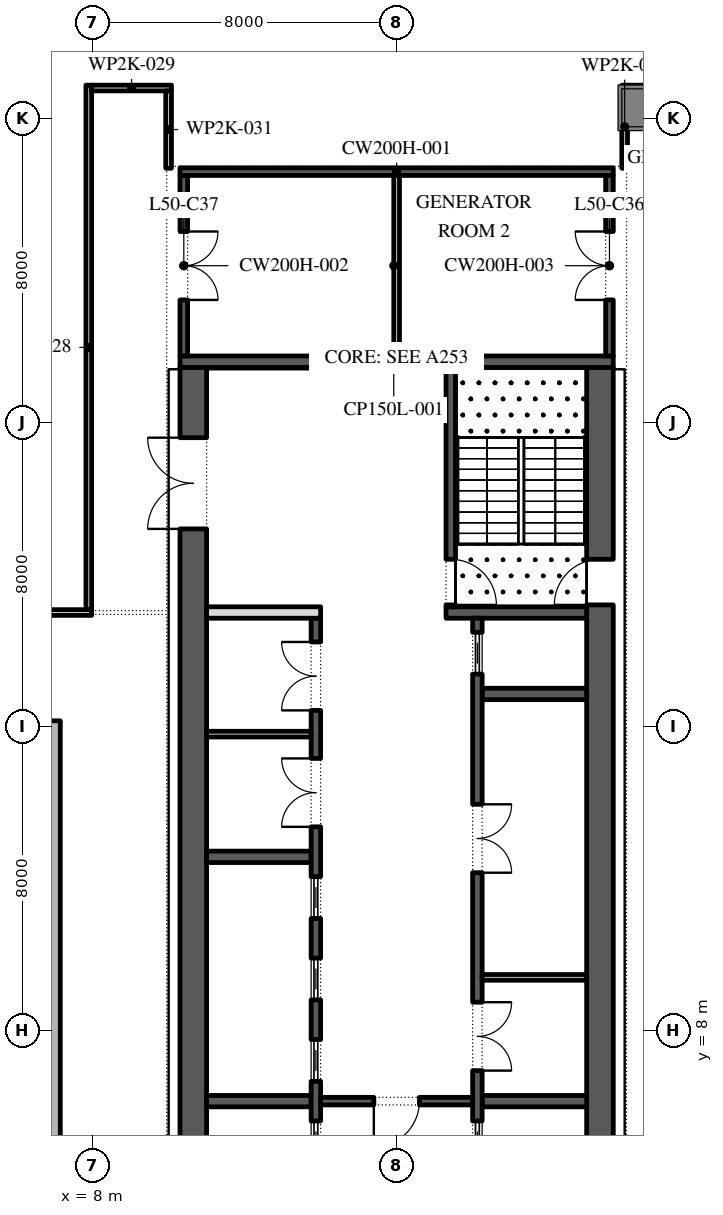
"""IFC4 building model, lengths in metres.
Left out: names, types, materials, properties, quantities, classifications, styles, units other than length and angle.
Written with IfcOpenShell. Run it as: python <this file> out.ifc"""

import sys

from ifc_helpers import new_model, si_unit, direction, frame, frame_2d, origin, place, context, subcontext, project, spatial, polyline, rectangle, outline, extrude, element, fill, save


model = new_model("IFC4")
c1 = context("Model", 3, precision=1e-05, world=origin(), true_north=direction((0.0, 1.0)))
c2 = subcontext(c1, "Body", "Model", "MODEL_VIEW")
j1 = project(units=[si_unit("LENGTHUNIT", "METRE"), si_unit("PLANEANGLEUNIT", "RADIAN")], contexts=[c1])
p1 = place(None, origin())
s1 = spatial("IfcSite", under=j1, at=p1, CompositionType="ELEMENT")
p2 = place(p1, origin())
s2 = spatial("IfcBuilding", under=s1, at=p2, CompositionType="ELEMENT")
p3 = place(p2, frame((0.0, 0.0, 226.2)))
s3 = spatial("IfcBuildingStorey", under=s2, at=p3, CompositionType="ELEMENT", Elevation=226.2)
p4 = place(p3, origin())
e1 = element("IfcWall", 1, at=p4, inside=s3, PredefinedType="STANDARD", context=c2, shape_type="SweptSolid", body=[
    extrude(outline(polyline([(-7.15, -2.15), (7.15, -2.15), (7.15, 16.15), (-7.15, 16.15), (-7.15, -2.15)]), holes=[polyline([(-7.0, -2.0), (-7.0, 16.0), (7.0, 16.0), (7.0, -2.0), (-7.0, -2.0)])]), origin(), (0.0, 0.0, 1.0), 10.35),
])
p5 = place(p3, frame((35.363, -6.512, -0.05), z_axis=(0.0, 0.0, 1.0), x_axis=(-0.224952557287, 0.974369717802, 0.0)))
e2 = element("IfcWall", 2, at=p5, inside=s3, PredefinedType="STANDARD", context=c2, shape_type="SweptSolid", body=[
    extrude(rectangle(XDim=58.252, YDim=0.2, at=frame_2d((29.126, 0.0))), origin(), (0.0, 0.0, 1.0), 1.1),
])
p6 = place(p3, frame((21.35, -2.45, 0.0), z_axis=(0.0, 0.0, 1.0), x_axis=(0.0, 1.0, 0.0)))
e3 = element("IfcWall", 3, at=p6, inside=s3, PredefinedType="SHEAR", context=c2, shape_type="SweptSolid", body=[
    extrude(rectangle(XDim=27.9, YDim=0.7, at=frame_2d((13.95, 0.0))), origin(), (0.0, 0.0, 1.0), 10.35),
])
p7 = place(p6, frame((5.05, 0.0, 0.0)))
e4 = element("IfcOpeningElement", 4, at=p7, cuts=e3, PredefinedType="OPENING", context=c2, shape_type="SweptSolid", body=[
    extrude(rectangle(XDim=1.2, YDim=2.1, at=frame_2d((0.6, 1.05))), frame((0.0, 0.36, 0.0), z_axis=(0.0, -1.0, 0.0), x_axis=(1.0, 0.0, 0.0)), (0.0, 0.0, 1.0), 0.72),
])
p8 = place(p6, frame((21.65, 0.0, 0.0)))
e5 = element("IfcOpeningElement", 5, at=p8, cuts=e3, PredefinedType="OPENING", context=c2, shape_type="SweptSolid", body=[
    extrude(rectangle(XDim=1.2, YDim=2.1, at=frame_2d((0.6, 1.05))), frame((0.0, 0.36, 0.0), z_axis=(0.0, -1.0, 0.0), x_axis=(1.0, 0.0, 0.0)), (0.0, 0.0, 1.0), 0.72),
])
p9 = place(p3, frame((10.65, -2.45, 0.0), z_axis=(0.0, 0.0, 1.0), x_axis=(0.0, 1.0, 0.0)))
e6 = element("IfcWall", 6, at=p9, inside=s3, PredefinedType="SHEAR", context=c2, shape_type="SweptSolid", body=[
    extrude(rectangle(XDim=27.9, YDim=0.7, at=frame_2d((13.95, 0.0))), origin(), (0.0, 0.0, 1.0), 10.35),
])
p10 = place(p9, frame((23.65, 0.0, 0.0)))
e7 = element("IfcOpeningElement", 7, at=p10, cuts=e6, PredefinedType="OPENING", context=c2, shape_type="SweptSolid", body=[
    extrude(rectangle(XDim=2.4, YDim=2.1, at=frame_2d((1.2, 1.05))), frame((0.0, 0.36, 0.0), z_axis=(0.0, -1.0, 0.0), x_axis=(1.0, 0.0, 0.0)), (0.0, 0.0, 1.0), 0.72),
])
p11 = place(p9, frame((0.637, 0.0, 0.0)))
e8 = element("IfcOpeningElement", 8, at=p11, cuts=e6, PredefinedType="OPENING", context=c2, shape_type="SweptSolid", body=[
    extrude(rectangle(XDim=1.8, YDim=2.4, at=frame_2d((0.9, 1.2))), frame((0.0, 0.36, 0.0), z_axis=(0.0, -1.0, 0.0), x_axis=(1.0, 0.0, 0.0)), (0.0, 0.0, 1.0), 0.72),
])
p12 = place(p9, frame((3.863, 0.0, 0.0)))
e9 = element("IfcOpeningElement", 9, at=p12, cuts=e6, PredefinedType="OPENING", context=c2, shape_type="SweptSolid", body=[
    extrude(rectangle(XDim=1.8, YDim=2.4, at=frame_2d((0.9, 1.2))), frame((0.0, 0.36, 0.0), z_axis=(0.0, -1.0, 0.0), x_axis=(1.0, 0.0, 0.0)), (0.0, 0.0, 1.0), 0.72),
])
p13 = place(p3, frame((10.3, 25.6, 0.0), z_axis=(0.0, 0.0, 1.0), x_axis=(1.0, 0.0, 0.0)))
e10 = element("IfcWall", 10, at=p13, inside=s3, PredefinedType="SHEAR", context=c2, shape_type="SweptSolid", body=[
    extrude(rectangle(XDim=11.4, YDim=0.3, at=frame_2d((5.7, 0.0))), origin(), (0.0, 0.0, 1.0), 10.35),
])
p14 = place(p3, frame((17.3, 19.0, 0.0), z_axis=(0.0, 0.0, 1.0), x_axis=(1.0, 0.0, 0.0)))
e11 = element("IfcWall", 11, at=p14, inside=s3, PredefinedType="SHEAR", context=c2, shape_type="SweptSolid", body=[
    extrude(rectangle(XDim=3.7, YDim=0.3, at=frame_2d((1.85, 0.0))), origin(), (0.0, 0.0, 1.0), 10.35),
])
p15 = place(p3, frame((17.425, 19.15, 0.0), z_axis=(0.0, 0.0, 1.0), x_axis=(0.0, 1.0, 0.0)))
e12 = element("IfcWall", 12, at=p15, inside=s3, PredefinedType="SHEAR", context=c2, shape_type="SweptSolid", body=[
    extrude(rectangle(XDim=6.3, YDim=0.25, at=frame_2d((3.15, 0.0))), origin(), (0.0, 0.0, 1.0), 10.35),
])
p16 = place(p15, frame((0.05, 0.0, 0.0)))
e13 = element("IfcOpeningElement", 13, at=p16, cuts=e12, PredefinedType="OPENING", context=c2, shape_type="SweptSolid", body=[
    extrude(rectangle(XDim=1.2, YDim=2.1, at=frame_2d((0.6, 1.05))), frame((0.0, 0.135, 0.0), z_axis=(0.0, -1.0, 0.0), x_axis=(1.0, 0.0, 0.0)), (0.0, 0.0, 1.0), 0.27),
])
for number, where, z_axis, x_axis in (
    (14, (18.25, 6.143, 0.0), (0.0, 0.0, 1.0), (1.0, 0.0, 0.0)),
    (15, (18.25, 16.857, 0.0), (0.0, 0.0, 1.0), (1.0, 0.0, 0.0)),
):
    element("IfcWall", number, at=place(p3, frame(where, z_axis=z_axis, x_axis=x_axis)), inside=s3, PredefinedType="SHEAR", context=c2, shape_type="SweptSolid", body=[
        extrude(rectangle(XDim=2.75, YDim=0.3, at=frame_2d((1.375, 0.0))), origin(), (0.0, 0.0, 1.0), 10.35),
    ])
p17 = place(p3, frame((18.125, 4.15, 0.0), z_axis=(0.0, 0.0, 1.0), x_axis=(0.0, 1.0, 0.0)))
e16 = element("IfcWall", 16, at=p17, inside=s3, PredefinedType="SHEAR", context=c2, shape_type="SweptSolid", body=[
    extrude(rectangle(XDim=14.7, YDim=0.25, at=frame_2d((7.35, 0.0))), origin(), (0.0, 0.0, 1.0), 10.35),
])
p18 = place(p17, frame((2.796, 0.0, 0.0)))
e17 = element("IfcOpeningElement", 17, at=p18, cuts=e16, PredefinedType="OPENING", context=c2, shape_type="SweptSolid", body=[
    extrude(rectangle(XDim=1.8, YDim=2.4, at=frame_2d((0.9, 1.2))), frame((0.0, 0.135, 0.0), z_axis=(0.0, -1.0, 0.0), x_axis=(1.0, 0.0, 0.0)), (0.0, 0.0, 1.0), 0.27),
])
p19 = place(p17, frame((8.004, 0.0, 0.0)))
e18 = element("IfcOpeningElement", 18, at=p19, cuts=e16, PredefinedType="OPENING", context=c2, shape_type="SweptSolid", body=[
    extrude(rectangle(XDim=1.8, YDim=2.4, at=frame_2d((0.9, 1.2))), frame((0.0, 0.135, 0.0), z_axis=(0.0, -1.0, 0.0), x_axis=(1.0, 0.0, 0.0)), (0.0, 0.0, 1.0), 0.27),
])
p20 = place(p17, frame((0.371, 0.0, 0.0)))
e19 = element("IfcOpeningElement", 19, at=p20, cuts=e16, PredefinedType="OPENING", context=c2, shape_type="SweptSolid", body=[
    extrude(rectangle(XDim=1.1, YDim=2.1, at=frame_2d((0.55, 1.05))), frame((0.0, 0.135, 0.0), z_axis=(0.0, -1.0, 0.0), x_axis=(1.0, 0.0, 0.0)), (0.0, 0.0, 1.0), 0.27),
])
p21 = place(p17, frame((13.229, 0.0, 0.0)))
e20 = element("IfcOpeningElement", 20, at=p21, cuts=e16, PredefinedType="OPENING", context=c2, shape_type="SweptSolid", body=[
    extrude(rectangle(XDim=1.1, YDim=2.1, at=frame_2d((0.55, 1.05))), frame((0.0, 0.135, 0.0), z_axis=(0.0, -1.0, 0.0), x_axis=(1.0, 0.0, 0.0)), (0.0, 0.0, 1.0), 0.27),
])
p22 = place(p3, frame((18.25, 9.4, 0.0), z_axis=(0.0, 0.0, 1.0), x_axis=(1.0, 0.0, 0.0)))
e21 = element("IfcWall", 21, at=p22, inside=s3, PredefinedType="PARTITIONING", context=c2, shape_type="SweptSolid", body=[
    extrude(rectangle(XDim=2.75, YDim=0.15, at=frame_2d((1.375, 0.0))), origin(), (0.0, 0.0, 1.0), 10.35),
])
for number, where, z_axis, x_axis in (
    (22, (11.0, 6.143, 0.0), (0.0, 0.0, 1.0), (1.0, 0.0, 0.0)),
    (23, (11.0, 12.571, 0.0), (0.0, 0.0, 1.0), (1.0, 0.0, 0.0)),
):
    element("IfcWall", number, at=place(p3, frame(where, z_axis=z_axis, x_axis=x_axis)), inside=s3, PredefinedType="SHEAR", context=c2, shape_type="SweptSolid", body=[
        extrude(rectangle(XDim=2.75, YDim=0.3, at=frame_2d((1.375, 0.0))), origin(), (0.0, 0.0, 1.0), 10.35),
    ])
p23 = place(p3, frame((13.875, -2.45, 0.0), z_axis=(0.0, 0.0, 1.0), x_axis=(0.0, 1.0, 0.0)))
e24 = element("IfcWall", 24, at=p23, inside=s3, PredefinedType="SHEAR", context=c2, shape_type="SweptSolid", body=[
    extrude(rectangle(XDim=21.3, YDim=0.25, at=frame_2d((10.65, 0.0))), origin(), (0.0, 0.0, 1.0), 10.35),
])
p24 = place(p23, frame((15.811, 0.0, 0.0)))
e25 = element("IfcOpeningElement", 25, at=p24, cuts=e24, PredefinedType="OPENING", context=c2, shape_type="SweptSolid", body=[
    extrude(rectangle(XDim=1.8, YDim=2.4, at=frame_2d((0.9, 1.2))), frame((0.0, 0.135, 0.0), z_axis=(0.0, -1.0, 0.0), x_axis=(1.0, 0.0, 0.0)), (0.0, 0.0, 1.0), 0.27),
])
p25 = place(p23, frame((18.875, 0.0, 0.0)))
e26 = element("IfcOpeningElement", 26, at=p25, cuts=e24, PredefinedType="OPENING", context=c2, shape_type="SweptSolid", body=[
    extrude(rectangle(XDim=1.8, YDim=2.4, at=frame_2d((0.9, 1.2))), frame((0.0, 0.135, 0.0), z_axis=(0.0, -1.0, 0.0), x_axis=(1.0, 0.0, 0.0)), (0.0, 0.0, 1.0), 0.27),
])
p26 = place(p23, frame((6.971, 0.0, 0.0)))
e27 = element("IfcOpeningElement", 27, at=p26, cuts=e24, PredefinedType="OPENING", context=c2, shape_type="SweptSolid", body=[
    extrude(rectangle(XDim=1.1, YDim=2.1, at=frame_2d((0.55, 1.05))), frame((0.0, 0.135, 0.0), z_axis=(0.0, -1.0, 0.0), x_axis=(1.0, 0.0, 0.0)), (0.0, 0.0, 1.0), 0.27),
])
p27 = place(p23, frame((9.114, 0.0, 0.0)))
e28 = element("IfcOpeningElement", 28, at=p27, cuts=e24, PredefinedType="OPENING", context=c2, shape_type="SweptSolid", body=[
    extrude(rectangle(XDim=1.1, YDim=2.1, at=frame_2d((0.55, 1.05))), frame((0.0, 0.135, 0.0), z_axis=(0.0, -1.0, 0.0), x_axis=(1.0, 0.0, 0.0)), (0.0, 0.0, 1.0), 0.27),
])
p28 = place(p23, frame((11.257, 0.0, 0.0)))
e29 = element("IfcOpeningElement", 29, at=p28, cuts=e24, PredefinedType="OPENING", context=c2, shape_type="SweptSolid", body=[
    extrude(rectangle(XDim=1.1, YDim=2.1, at=frame_2d((0.55, 1.05))), frame((0.0, 0.135, 0.0), z_axis=(0.0, -1.0, 0.0), x_axis=(1.0, 0.0, 0.0)), (0.0, 0.0, 1.0), 0.27),
])
p29 = place(p23, frame((13.4, 0.0, 0.0)))
e30 = element("IfcOpeningElement", 30, at=p29, cuts=e24, PredefinedType="OPENING", context=c2, shape_type="SweptSolid", body=[
    extrude(rectangle(XDim=1.1, YDim=2.1, at=frame_2d((0.55, 1.05))), frame((0.0, 0.135, 0.0), z_axis=(0.0, -1.0, 0.0), x_axis=(1.0, 0.0, 0.0)), (0.0, 0.0, 1.0), 0.27),
])
p30 = place(p3, frame((11.0, 19.0, 0.0), z_axis=(0.0, 0.0, 1.0), x_axis=(1.0, 0.0, 0.0)))
e31 = element("IfcWall", 31, at=p30, inside=s3, PredefinedType="PARTITIONING", context=c2, shape_type="SweptSolid", body=[
    extrude(rectangle(XDim=3.0, YDim=0.3, at=frame_2d((1.5, 0.0))), origin(), (0.0, 0.0, 1.0), 10.35),
])
p31 = place(p3, frame((11.0, 15.8, 0.0), z_axis=(0.0, 0.0, 1.0), x_axis=(1.0, 0.0, 0.0)))
e32 = element("IfcWall", 32, at=p31, inside=s3, PredefinedType="PARTITIONING", context=c2, shape_type="SweptSolid", body=[
    extrude(rectangle(XDim=2.75, YDim=0.15, at=frame_2d((1.375, 0.0))), origin(), (0.0, 0.0, 1.0), 10.35),
])
p32 = place(p3, frame((14.0, 6.143, 0.0), z_axis=(0.0, 0.0, 1.0), x_axis=(1.0, 0.0, 0.0)))
e33 = element("IfcWall", 33, at=p32, inside=s3, PredefinedType="SHEAR", context=c2, shape_type="SweptSolid", body=[
    extrude(rectangle(XDim=4.0, YDim=0.2, at=frame_2d((2.0, 0.0))), origin(), (0.0, 0.0, 1.0), 10.35),
])
p33 = place(p32, frame((1.4, 0.0, 0.0)))
e34 = element("IfcOpeningElement", 34, at=p33, cuts=e33, PredefinedType="OPENING", context=c2, shape_type="SweptSolid", body=[
    extrude(rectangle(XDim=1.2, YDim=2.1, at=frame_2d((0.6, 1.05))), frame((0.0, 0.11, 0.0), z_axis=(0.0, -1.0, 0.0), x_axis=(1.0, 0.0, 0.0)), (0.0, 0.0, 1.0), 0.22),
])
p34 = place(p3, frame((21.6, 25.75, 0.0), z_axis=(0.0, 0.0, 1.0), x_axis=(0.0, 1.0, 0.0)))
e35 = element("IfcWall", 35, at=p34, inside=s3, PredefinedType="SHEAR", context=c2, shape_type="SweptSolid", body=[
    extrude(rectangle(XDim=4.75, YDim=0.2, at=frame_2d((2.375, 0.0))), origin(), (0.0, 0.0, 1.0), 10.35),
])
p35 = place(p34, frame((1.475, 0.0, 0.0)))
e36 = element("IfcOpeningElement", 36, at=p35, cuts=e35, PredefinedType="OPENING", context=c2, shape_type="SweptSolid", body=[
    extrude(rectangle(XDim=1.8, YDim=2.4, at=frame_2d((0.9, 1.2))), frame((0.0, 0.11, 0.0), z_axis=(0.0, -1.0, 0.0), x_axis=(1.0, 0.0, 0.0)), (0.0, 0.0, 1.0), 0.22),
])
p36 = place(p3, frame((10.4, 25.75, 0.0), z_axis=(0.0, 0.0, 1.0), x_axis=(0.0, 1.0, 0.0)))
e37 = element("IfcWall", 37, at=p36, inside=s3, PredefinedType="SHEAR", context=c2, shape_type="SweptSolid", body=[
    extrude(rectangle(XDim=4.75, YDim=0.2, at=frame_2d((2.375, 0.0))), origin(), (0.0, 0.0, 1.0), 10.35),
])
p37 = place(p36, frame((1.475, 0.0, 0.0)))
e38 = element("IfcOpeningElement", 38, at=p37, cuts=e37, PredefinedType="OPENING", context=c2, shape_type="SweptSolid", body=[
    extrude(rectangle(XDim=1.8, YDim=2.4, at=frame_2d((0.9, 1.2))), frame((0.0, 0.11, 0.0), z_axis=(0.0, -1.0, 0.0), x_axis=(1.0, 0.0, 0.0)), (0.0, 0.0, 1.0), 0.22),
])
p38 = place(p3, frame((10.3, 30.6, 0.0), z_axis=(0.0, 0.0, 1.0), x_axis=(1.0, 0.0, 0.0)))
e39 = element("IfcWall", 39, at=p38, inside=s3, PredefinedType="SHEAR", context=c2, shape_type="SweptSolid", body=[
    extrude(rectangle(XDim=11.4, YDim=0.2, at=frame_2d((5.7, 0.0))), origin(), (0.0, 0.0, 1.0), 10.35),
])
p39 = place(p3, frame((16.0, 25.75, 0.0), z_axis=(0.0, 0.0, 1.0), x_axis=(0.0, 1.0, 0.0)))
e40 = element("IfcWall", 40, at=p39, inside=s3, PredefinedType="PARTITIONING", context=c2, shape_type="SweptSolid", body=[
    extrude(rectangle(XDim=4.75, YDim=0.15, at=frame_2d((2.375, 0.0))), origin(), (0.0, 0.0, 1.0), 10.35),
])
p40 = place(p3, frame((1.085, 19.0, 0.0), z_axis=(0.0, 0.0, 1.0), x_axis=(1.0, 0.0, 0.0)))
e41 = element("IfcWall", 41, at=p40, inside=s3, PredefinedType="PARTITIONING", context=c2, shape_type="SweptSolid", body=[
    extrude(rectangle(XDim=6.89, YDim=0.15, at=frame_2d((3.445, 0.0))), origin(), (0.0, 0.0, 1.0), 10.35),
])
p41 = place(p3, frame((7.9, 19.075, 0.0), z_axis=(0.0, 0.0, 1.0), x_axis=(0.0, 1.0, 0.0)))
e42 = element("IfcWall", 42, at=p41, inside=s3, PredefinedType="PARTITIONING", context=c2, shape_type="SweptSolid", body=[
    extrude(rectangle(XDim=13.8, YDim=0.15, at=frame_2d((6.9, 0.0))), origin(), (0.0, 0.0, 1.0), 10.35),
])
p42 = place(p3, frame((7.975, 32.8, 0.0), z_axis=(0.0, 0.0, 1.0), x_axis=(1.0, 0.0, 0.0)))
e43 = element("IfcWall", 43, at=p42, inside=s3, PredefinedType="PARTITIONING", context=c2, shape_type="SweptSolid", body=[
    extrude(rectangle(XDim=2.1, YDim=0.15, at=frame_2d((1.05, 0.0))), origin(), (0.0, 0.0, 1.0), 10.35),
])
p43 = place(p3, frame((10.0, 32.725, 0.0), z_axis=(0.0, 0.0, 1.0), x_axis=(0.0, -1.0, 0.0)))
e44 = element("IfcWall", 44, at=p43, inside=s3, PredefinedType="PARTITIONING", context=c2, shape_type="SweptSolid", body=[
    extrude(rectangle(XDim=2.035, YDim=0.15, at=frame_2d((1.018, 0.0))), origin(), (0.0, 0.0, 1.0), 10.35),
])
p44 = place(p3, frame((22.0, 30.69, 0.0), z_axis=(0.0, 0.0, 1.0), x_axis=(0.0, 1.0, 0.0)))
e45 = element("IfcWall", 45, at=p44, inside=s3, PredefinedType="PARTITIONING", context=c2, shape_type="SweptSolid", body=[
    extrude(rectangle(XDim=2.185, YDim=0.15, at=frame_2d((1.093, 0.0))), origin(), (0.0, 0.0, 1.0), 10.35),
])
p45 = place(p3, frame((22.075, 32.8, 0.0), z_axis=(0.0, 0.0, 1.0), x_axis=(1.0, 0.0, 0.0)))
e46 = element("IfcWall", 46, at=p45, inside=s3, PredefinedType="PARTITIONING", context=c2, shape_type="SweptSolid", body=[
    extrude(rectangle(XDim=2.025, YDim=0.15, at=frame_2d((1.013, 0.0))), origin(), (0.0, 0.0, 1.0), 10.35),
])
p46 = place(p18, frame((1.8, -0.2, 0.0), z_axis=(0.0, 0.0, 1.0), x_axis=(-1.0, 0.0, 0.0)))
e47 = element("IfcDoor", 47, at=p46, inside=s3, OperationType="DOUBLE_DOOR_SINGLE_SWING", PredefinedType="DOOR", context=c2, shape_type="SweptSolid", body=[
    extrude(rectangle(XDim=1.8, YDim=2.4, at=frame_2d((0.9, 1.2))), frame((0.0, -0.075, 0.0), z_axis=(0.0, -1.0, 0.0), x_axis=(1.0, 0.0, 0.0)), (0.0, 0.0, 1.0), 0.05),
])
fill(e17, e47)
p47 = place(p19, frame((1.8, -0.2, 0.0), z_axis=(0.0, 0.0, 1.0), x_axis=(-1.0, 0.0, 0.0)))
e48 = element("IfcDoor", 48, at=p47, inside=s3, OperationType="DOUBLE_DOOR_SINGLE_SWING", PredefinedType="DOOR", context=c2, shape_type="SweptSolid", body=[
    extrude(rectangle(XDim=1.8, YDim=2.4, at=frame_2d((0.9, 1.2))), frame((0.0, -0.075, 0.0), z_axis=(0.0, -1.0, 0.0), x_axis=(1.0, 0.0, 0.0)), (0.0, 0.0, 1.0), 0.05),
])
fill(e18, e48)
p48 = place(p20, origin())
e49 = element("IfcDoor", 49, at=p48, inside=s3, OperationType="SLIDING_TO_LEFT", PredefinedType="DOOR", context=c2, shape_type="SweptSolid", body=[
    extrude(rectangle(XDim=1.1, YDim=2.1, at=frame_2d((0.55, 1.05))), frame((0.0, 0.025, 0.0), z_axis=(0.0, -1.0, 0.0), x_axis=(1.0, 0.0, 0.0)), (0.0, 0.0, 1.0), 0.05),
])
fill(e19, e49)
p49 = place(p21, origin())
e50 = element("IfcDoor", 50, at=p49, inside=s3, OperationType="SLIDING_TO_LEFT", PredefinedType="DOOR", context=c2, shape_type="SweptSolid", body=[
    extrude(rectangle(XDim=1.1, YDim=2.1, at=frame_2d((0.55, 1.05))), frame((0.0, 0.025, 0.0), z_axis=(0.0, -1.0, 0.0), x_axis=(1.0, 0.0, 0.0)), (0.0, 0.0, 1.0), 0.05),
])
fill(e20, e50)
p50 = place(p24, origin())
e51 = element("IfcDoor", 51, at=p50, inside=s3, OperationType="DOUBLE_DOOR_SINGLE_SWING", PredefinedType="DOOR", context=c2, shape_type="SweptSolid", body=[
    extrude(rectangle(XDim=1.8, YDim=2.4, at=frame_2d((0.9, 1.2))), frame((0.0, 0.125, 0.0), z_axis=(0.0, -1.0, 0.0), x_axis=(1.0, 0.0, 0.0)), (0.0, 0.0, 1.0), 0.05),
])
fill(e25, e51)
p51 = place(p25, origin())
e52 = element("IfcDoor", 52, at=p51, inside=s3, OperationType="DOUBLE_DOOR_SINGLE_SWING", PredefinedType="DOOR", context=c2, shape_type="SweptSolid", body=[
    extrude(rectangle(XDim=1.8, YDim=2.4, at=frame_2d((0.9, 1.2))), frame((0.0, 0.125, 0.0), z_axis=(0.0, -1.0, 0.0), x_axis=(1.0, 0.0, 0.0)), (0.0, 0.0, 1.0), 0.05),
])
fill(e26, e52)
p52 = place(p26, origin())
e53 = element("IfcDoor", 53, at=p52, inside=s3, OperationType="SLIDING_TO_LEFT", PredefinedType="DOOR", context=c2, shape_type="SweptSolid", body=[
    extrude(rectangle(XDim=1.1, YDim=2.1, at=frame_2d((0.55, 1.05))), frame((0.0, 0.025, 0.0), z_axis=(0.0, -1.0, 0.0), x_axis=(1.0, 0.0, 0.0)), (0.0, 0.0, 1.0), 0.05),
])
fill(e27, e53)
p53 = place(p27, origin())
e54 = element("IfcDoor", 54, at=p53, inside=s3, OperationType="SLIDING_TO_LEFT", PredefinedType="DOOR", context=c2, shape_type="SweptSolid", body=[
    extrude(rectangle(XDim=1.1, YDim=2.1, at=frame_2d((0.55, 1.05))), frame((0.0, 0.025, 0.0), z_axis=(0.0, -1.0, 0.0), x_axis=(1.0, 0.0, 0.0)), (0.0, 0.0, 1.0), 0.05),
])
fill(e28, e54)
p54 = place(p28, origin())
e55 = element("IfcDoor", 55, at=p54, inside=s3, OperationType="SLIDING_TO_LEFT", PredefinedType="DOOR", context=c2, shape_type="SweptSolid", body=[
    extrude(rectangle(XDim=1.1, YDim=2.1, at=frame_2d((0.55, 1.05))), frame((0.0, 0.025, 0.0), z_axis=(0.0, -1.0, 0.0), x_axis=(1.0, 0.0, 0.0)), (0.0, 0.0, 1.0), 0.05),
])
fill(e29, e55)
p55 = place(p29, origin())
e56 = element("IfcDoor", 56, at=p55, inside=s3, OperationType="SLIDING_TO_LEFT", PredefinedType="DOOR", context=c2, shape_type="SweptSolid", body=[
    extrude(rectangle(XDim=1.1, YDim=2.1, at=frame_2d((0.55, 1.05))), frame((0.0, 0.025, 0.0), z_axis=(0.0, -1.0, 0.0), x_axis=(1.0, 0.0, 0.0)), (0.0, 0.0, 1.0), 0.05),
])
fill(e30, e56)
p56 = place(p33, frame((1.2, 0.0, 0.0), z_axis=(0.0, 0.0, 1.0), x_axis=(-1.0, 0.0, 0.0)))
e57 = element("IfcDoor", 57, at=p56, inside=s3, OperationType="SINGLE_SWING_LEFT", PredefinedType="DOOR", context=c2, shape_type="SweptSolid", body=[
    extrude(rectangle(XDim=1.2, YDim=2.1, at=frame_2d((0.6, 1.05))), frame((0.0, 0.025, 0.0), z_axis=(0.0, -1.0, 0.0), x_axis=(1.0, 0.0, 0.0)), (0.0, 0.0, 1.0), 0.05),
])
fill(e34, e57)
p57 = place(p10, origin())
e58 = element("IfcDoor", 58, at=p57, inside=s3, OperationType="DOUBLE_DOOR_SINGLE_SWING", PredefinedType="DOOR", context=c2, shape_type="SweptSolid", body=[
    extrude(rectangle(XDim=2.4, YDim=2.1, at=frame_2d((1.2, 1.05))), frame((0.0, 0.025, 0.0), z_axis=(0.0, -1.0, 0.0), x_axis=(1.0, 0.0, 0.0)), (0.0, 0.0, 1.0), 0.05),
])
fill(e7, e58)
p58 = place(p16, frame((1.2, 0.0, 0.0), z_axis=(0.0, 0.0, 1.0), x_axis=(-1.0, 0.0, 0.0)))
e59 = element("IfcDoor", 59, at=p58, inside=s3, OperationType="SINGLE_SWING_LEFT", PredefinedType="DOOR", context=c2, shape_type="SweptSolid", body=[
    extrude(rectangle(XDim=1.2, YDim=2.1, at=frame_2d((0.6, 1.05))), frame((0.0, 0.025, 0.0), z_axis=(0.0, -1.0, 0.0), x_axis=(1.0, 0.0, 0.0)), (0.0, 0.0, 1.0), 0.05),
])
fill(e13, e59)
p59 = place(p8, origin())
e60 = element("IfcDoor", 60, at=p59, inside=s3, OperationType="SINGLE_SWING_RIGHT", PredefinedType="DOOR", context=c2, shape_type="SweptSolid", body=[
    extrude(rectangle(XDim=1.2, YDim=2.1, at=frame_2d((0.6, 1.05))), frame((0.0, 0.025, 0.0), z_axis=(0.0, -1.0, 0.0), x_axis=(1.0, 0.0, 0.0)), (0.0, 0.0, 1.0), 0.05),
])
fill(e5, e60)
p60 = place(p35, origin())
e61 = element("IfcDoor", 61, at=p60, inside=s3, OperationType="DOUBLE_DOOR_SINGLE_SWING", PredefinedType="DOOR", context=c2, shape_type="SweptSolid", body=[
    extrude(rectangle(XDim=1.8, YDim=2.4, at=frame_2d((0.9, 1.2))), frame((0.0, 0.1, 0.0), z_axis=(0.0, -1.0, 0.0), x_axis=(1.0, 0.0, 0.0)), (0.0, 0.0, 1.0), 0.05),
])
fill(e36, e61)
p61 = place(p37, frame((1.8, -0.15, 0.0), z_axis=(0.0, 0.0, 1.0), x_axis=(-1.0, 0.0, 0.0)))
e62 = element("IfcDoor", 62, at=p61, inside=s3, OperationType="DOUBLE_DOOR_SINGLE_SWING", PredefinedType="DOOR", context=c2, shape_type="SweptSolid", body=[
    extrude(rectangle(XDim=1.8, YDim=2.4, at=frame_2d((0.9, 1.2))), frame((0.0, -0.05, 0.0), z_axis=(0.0, -1.0, 0.0), x_axis=(1.0, 0.0, 0.0)), (0.0, 0.0, 1.0), 0.05),
])
fill(e38, e62)
save(model, sys.argv[1])
